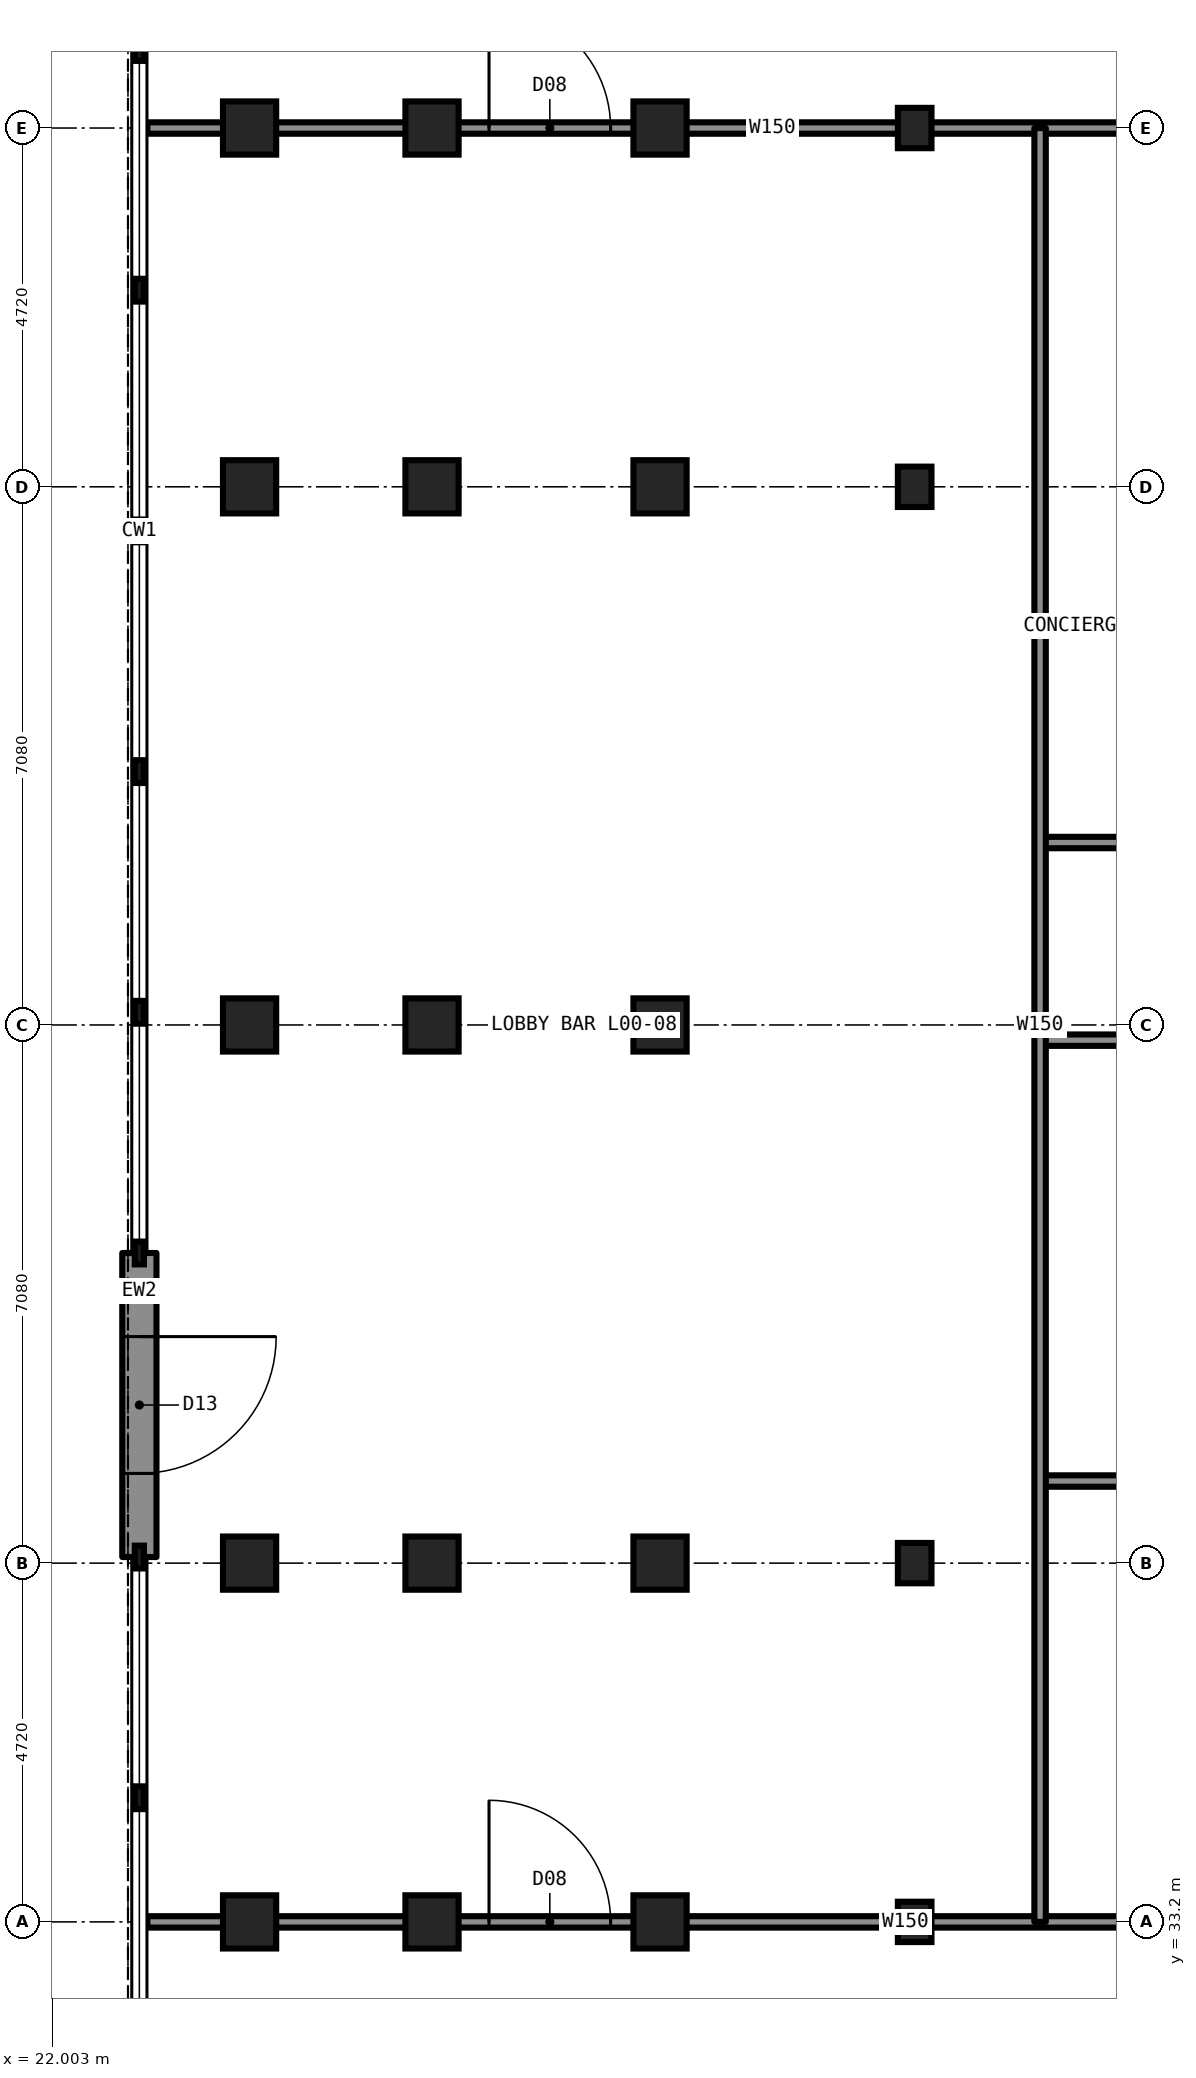
"""IFC4 building model, lengths in metres.
Left out: names, types, materials, properties, quantities, classifications, styles, units other than length and angle.
Written with IfcOpenShell. Run it as: python <this file> out.ifc"""

import sys

from ifc_helpers import new_model, si_unit, direction, frame, frame_2d, origin, origin_2d, place, context, subcontext, project, spatial, rectangle, i_section, extrude, element, fill, save


model = new_model("IFC4")
c1 = context("Model", 3, precision=1e-05, world=origin(), true_north=direction((0.0, 1.0)))
c2 = subcontext(c1, "Body", "Model", "MODEL_VIEW")
j1 = project(units=[si_unit("LENGTHUNIT", "METRE"), si_unit("PLANEANGLEUNIT", "RADIAN")], contexts=[c1])
p1 = place(None, origin())
s1 = spatial("IfcSite", under=j1, at=p1, CompositionType="ELEMENT")
p2 = place(p1, origin())
s2 = spatial("IfcBuilding", under=s1, at=p2, CompositionType="ELEMENT")
p3 = place(p2, origin())
s3 = spatial("IfcBuildingStorey", under=s2, at=p3, CompositionType="ELEMENT", Elevation=0.0)
for number, where, z_axis, x_axis in (
    (1, (33.35, 33.2, 0.0), (0.0, 0.0, 1.0), (1.0, 0.0, 0.0)),
    (2, (33.35, 37.92, 0.0), (0.0, 0.0, 1.0), (1.0, 0.0, 0.0)),
    (3, (33.35, 52.08, 0.0), (0.0, 0.0, 1.0), (1.0, 0.0, 0.0)),
    (4, (33.35, 56.8, 0.0), (0.0, 0.0, 1.0), (1.0, 0.0, 0.0)),
):
    element("IfcColumn", number, at=place(p3, frame(where, z_axis=z_axis, x_axis=x_axis)), inside=s3, PredefinedType="COLUMN", context=c2, shape_type="SweptSolid", body=[
        extrude(i_section(OverallWidth=0.442, OverallDepth=0.531, WebThickness=0.066, FlangeThickness=0.106, at=origin_2d()), origin(), (0.0, 0.0, 1.0), 5.6),
    ])
for number, where, z_axis, x_axis in (
    (5, (24.6, 33.2, 0.0), (0.0, 0.0, 1.0), (1.0, 0.0, 0.0)),
    (6, (24.6, 37.92, 0.0), (0.0, 0.0, 1.0), (1.0, 0.0, 0.0)),
    (7, (24.6, 45.0, 0.0), (0.0, 0.0, 1.0), (1.0, 0.0, 0.0)),
    (8, (24.6, 52.08, 0.0), (0.0, 0.0, 1.0), (1.0, 0.0, 0.0)),
    (9, (24.6, 56.8, 0.0), (0.0, 0.0, 1.0), (1.0, 0.0, 0.0)),
    (10, (27.0, 33.2, 0.0), (0.0, 0.0, 1.0), (1.0, 0.0, 0.0)),
    (11, (27.0, 37.92, 0.0), (0.0, 0.0, 1.0), (1.0, 0.0, 0.0)),
    (12, (27.0, 45.0, 0.0), (0.0, 0.0, 1.0), (1.0, 0.0, 0.0)),
    (13, (27.0, 52.08, 0.0), (0.0, 0.0, 1.0), (1.0, 0.0, 0.0)),
    (14, (27.0, 56.8, 0.0), (0.0, 0.0, 1.0), (1.0, 0.0, 0.0)),
    (15, (30.0, 33.2, 0.0), (0.0, 0.0, 1.0), (1.0, 0.0, 0.0)),
    (16, (30.0, 37.92, 0.0), (0.0, 0.0, 1.0), (1.0, 0.0, 0.0)),
    (17, (30.0, 45.0, 0.0), (0.0, 0.0, 1.0), (1.0, 0.0, 0.0)),
    (18, (30.0, 52.08, 0.0), (0.0, 0.0, 1.0), (1.0, 0.0, 0.0)),
    (19, (30.0, 56.8, 0.0), (0.0, 0.0, 1.0), (1.0, 0.0, 0.0)),
):
    element("IfcColumn", number, at=place(p3, frame(where, z_axis=z_axis, x_axis=x_axis)), inside=s3, PredefinedType="COLUMN", context=c2, shape_type="SweptSolid", body=[
        extrude(rectangle(XDim=0.7, YDim=0.7, at=origin_2d()), origin(), (0.0, 0.0, 1.0), 5.6),
    ])
p4 = place(p3, frame((35.0, 44.8, 0.0), z_axis=(0.0, 0.0, 1.0), x_axis=(1.0, 0.0, 0.0)))
e20 = element("IfcWall", 20, at=p4, inside=s3, PredefinedType="PARTITIONING", context=c2, shape_type="SweptSolid", body=[
    extrude(rectangle(XDim=8.2, YDim=0.15, at=frame_2d((4.1, 0.0))), origin(), (0.0, 0.0, 1.0), 5.25),
])
p5 = place(p3, frame((23.255, 33.2, 0.0), z_axis=(0.0, 0.0, 1.0), x_axis=(1.0, 0.0, 0.0)))
e21 = element("IfcWall", 21, at=p5, inside=s3, PredefinedType="PARTITIONING", context=c2, shape_type="SweptSolid", body=[
    extrude(rectangle(XDim=19.945, YDim=0.15, at=frame_2d((9.973, 0.0))), origin(), (0.0, 0.0, 1.0), 5.25),
])
p6 = place(p5, frame((4.495, 0.0, 0.0)))
e22 = element("IfcOpeningElement", 22, at=p6, cuts=e21, PredefinedType="OPENING", context=c2, shape_type="SweptSolid", body=[
    extrude(rectangle(XDim=1.6, YDim=2.4, at=frame_2d((0.8, 1.2))), frame((0.0, 0.085, 0.0), z_axis=(0.0, -1.0, 0.0), x_axis=(1.0, 0.0, 0.0)), (0.0, 0.0, 1.0), 0.17),
])
p7 = place(p3, frame((35.0, 39.0, 0.0), z_axis=(0.0, 0.0, 1.0), x_axis=(1.0, 0.0, 0.0)))
e23 = element("IfcWall", 23, at=p7, inside=s3, PredefinedType="PARTITIONING", context=c2, shape_type="SweptSolid", body=[
    extrude(rectangle(XDim=8.2, YDim=0.15, at=frame_2d((4.1, 0.0))), origin(), (0.0, 0.0, 1.0), 5.25),
])
p8 = place(p3, frame((23.255, 56.8, 0.0), z_axis=(0.0, 0.0, 1.0), x_axis=(1.0, 0.0, 0.0)))
e24 = element("IfcWall", 24, at=p8, inside=s3, PredefinedType="PARTITIONING", context=c2, shape_type="SweptSolid", body=[
    extrude(rectangle(XDim=16.445, YDim=0.15, at=frame_2d((8.223, 0.0))), origin(), (0.0, 0.0, 1.0), 5.25),
])
p9 = place(p8, frame((13.545, 0.0, 0.0)))
e25 = element("IfcOpeningElement", 25, at=p9, cuts=e24, PredefinedType="OPENING", context=c2, shape_type="SweptSolid", body=[
    extrude(rectangle(XDim=1.2, YDim=2.2, at=frame_2d((0.6, 1.1))), frame((0.0, 0.085, 0.0), z_axis=(0.0, -1.0, 0.0), x_axis=(1.0, 0.0, 0.0)), (0.0, 0.0, 1.0), 0.17),
])
p10 = place(p8, frame((4.495, 0.0, 0.0)))
e26 = element("IfcOpeningElement", 26, at=p10, cuts=e24, PredefinedType="OPENING", context=c2, shape_type="SweptSolid", body=[
    extrude(rectangle(XDim=1.6, YDim=2.4, at=frame_2d((0.8, 1.2))), frame((0.0, 0.085, 0.0), z_axis=(0.0, -1.0, 0.0), x_axis=(1.0, 0.0, 0.0)), (0.0, 0.0, 1.0), 0.17),
])
p11 = place(p3, frame((35.0, 47.4, 0.0), z_axis=(0.0, 0.0, 1.0), x_axis=(1.0, 0.0, 0.0)))
e27 = element("IfcWall", 27, at=p11, inside=s3, PredefinedType="PARTITIONING", context=c2, shape_type="SweptSolid", body=[
    extrude(rectangle(XDim=4.6, YDim=0.15, at=frame_2d((2.3, 0.0))), origin(), (0.0, 0.0, 1.0), 5.25),
])
p12 = place(p3, frame((35.0, 33.2, 0.0), z_axis=(0.0, 0.0, 1.0), x_axis=(0.0, 1.0, 0.0)))
e28 = element("IfcWall", 28, at=p12, inside=s3, PredefinedType="PARTITIONING", context=c2, shape_type="SweptSolid", body=[
    extrude(rectangle(XDim=23.6, YDim=0.15, at=frame_2d((11.8, 0.0))), origin(), (0.0, 0.0, 1.0), 5.25),
])
p13 = place(p3, frame((23.15, 42.0, 0.0), z_axis=(0.0, 0.0, 1.0), x_axis=(0.0, -1.0, 0.0)))
e29 = element("IfcWall", 29, at=p13, inside=s3, PredefinedType="SOLIDWALL", context=c2, shape_type="SweptSolid", body=[
    extrude(rectangle(XDim=4.0, YDim=0.45, at=frame_2d((2.0, 0.0))), origin(), (0.0, 0.0, 1.0), 5.25),
])
p14 = place(p13, frame((1.1, 0.0, 0.0)))
e30 = element("IfcOpeningElement", 30, at=p14, cuts=e29, PredefinedType="OPENING", context=c2, shape_type="SweptSolid", body=[
    extrude(rectangle(XDim=1.8, YDim=2.4, at=frame_2d((0.9, 1.2))), frame((0.0, 0.235, 0.0), z_axis=(0.0, -1.0, 0.0), x_axis=(1.0, 0.0, 0.0)), (0.0, 0.0, 1.0), 0.47),
])
p15 = place(p6, origin())
e31 = element("IfcDoor", 31, at=p15, inside=s3, OperationType="DOUBLE_DOOR_SINGLE_SWING", PredefinedType="DOOR", context=c2, shape_type="SweptSolid", body=[
    extrude(rectangle(XDim=1.6, YDim=2.4, at=frame_2d((0.8, 1.2))), frame((0.0, 0.025, 0.0), z_axis=(0.0, -1.0, 0.0), x_axis=(1.0, 0.0, 0.0)), (0.0, 0.0, 1.0), 0.05),
])
fill(e22, e31)
p16 = place(p10, origin())
e32 = element("IfcDoor", 32, at=p16, inside=s3, OperationType="DOUBLE_DOOR_SINGLE_SWING", PredefinedType="DOOR", context=c2, shape_type="SweptSolid", body=[
    extrude(rectangle(XDim=1.6, YDim=2.4, at=frame_2d((0.8, 1.2))), frame((0.0, 0.025, 0.0), z_axis=(0.0, -1.0, 0.0), x_axis=(1.0, 0.0, 0.0)), (0.0, 0.0, 1.0), 0.05),
])
fill(e26, e32)
p17 = place(p14, origin())
e33 = element("IfcDoor", 33, at=p17, inside=s3, OperationType="DOUBLE_DOOR_SINGLE_SWING", PredefinedType="DOOR", context=c2, shape_type="SweptSolid", body=[
    extrude(rectangle(XDim=1.8, YDim=2.4, at=frame_2d((0.9, 1.2))), frame((0.0, 0.025, 0.0), z_axis=(0.0, -1.0, 0.0), x_axis=(1.0, 0.0, 0.0)), (0.0, 0.0, 1.0), 0.05),
])
fill(e30, e33)
save(model, sys.argv[1])
